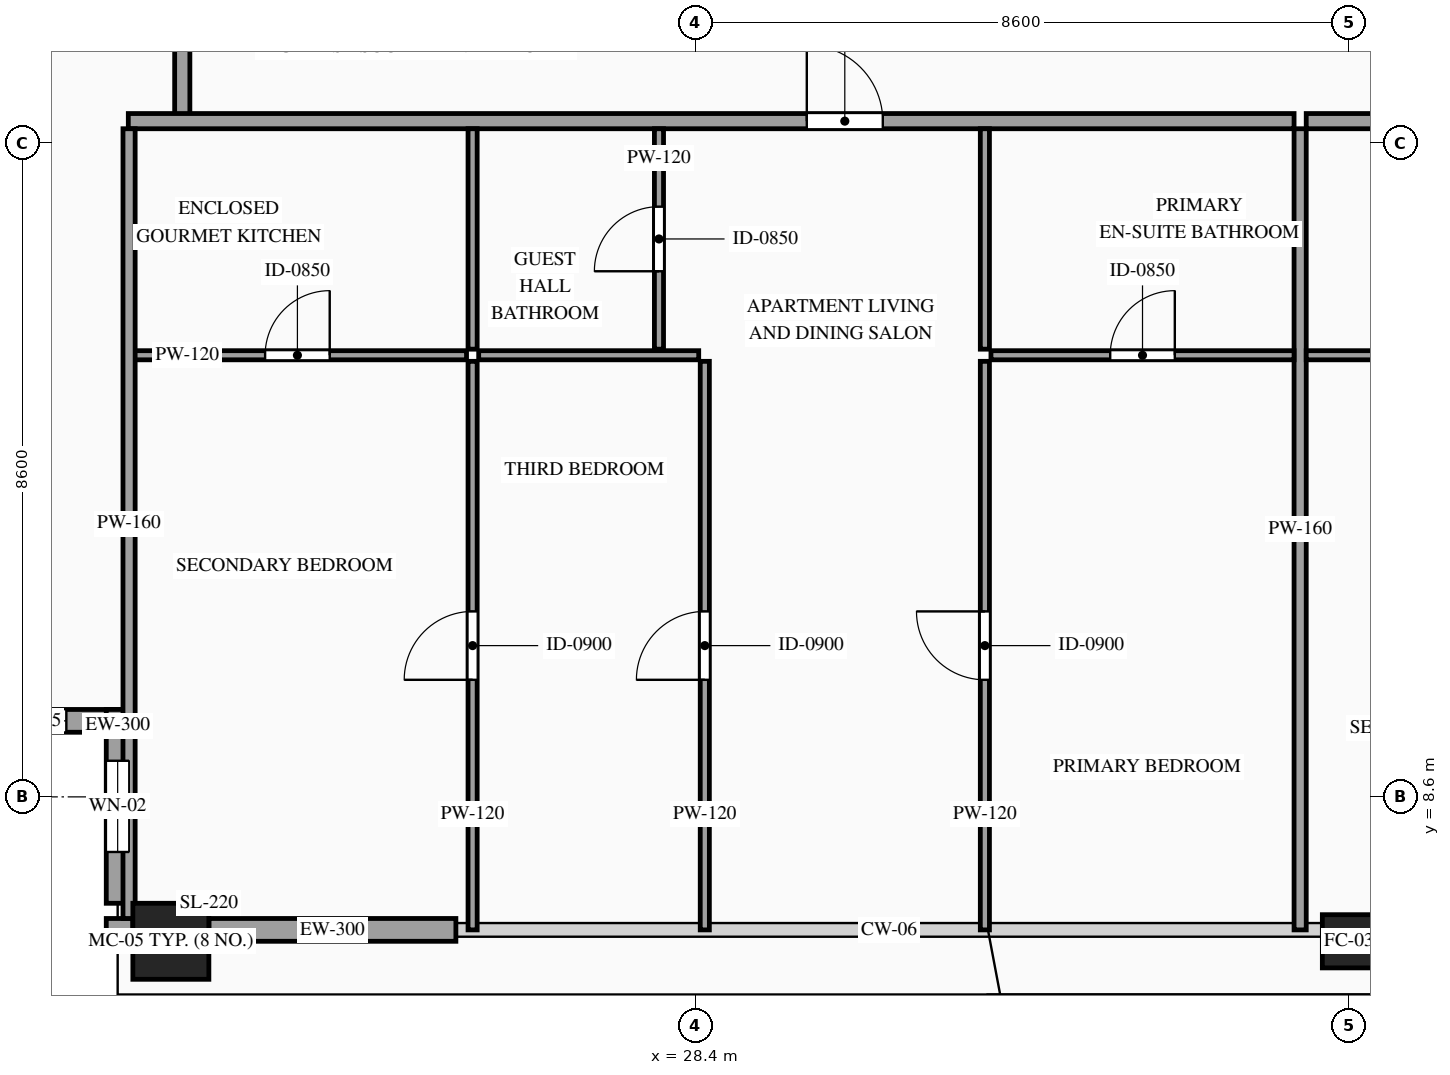
"""IFC4 building model, lengths in metres.
Left out: names, types, materials, properties, quantities, classifications, styles, units other than length and angle.
Written with IfcOpenShell. Run it as: python <this file> out.ifc"""

import sys

from ifc_helpers import new_model, si_unit, direction, frame, frame_2d, origin, origin_2d, place, context, subcontext, project, spatial, rectangle, hollow_rectangle, extrude, source, transform, mapped, element, fill, save


model = new_model("IFC4")
c1 = context("Model", 3, precision=1e-05, world=origin(), true_north=direction((0.0, 1.0)))
c2 = subcontext(c1, "Body", "Model", "MODEL_VIEW")
j1 = project(units=[si_unit("LENGTHUNIT", "METRE"), si_unit("PLANEANGLEUNIT", "RADIAN")], contexts=[c1])
p1 = place(None, origin())
s1 = spatial("IfcSite", under=j1, at=p1, CompositionType="ELEMENT")
p2 = place(p1, origin())
s2 = spatial("IfcBuilding", under=s1, at=p2, CompositionType="ELEMENT")
p3 = place(p2, frame((0.0, 0.0, 299.6)))
s3 = spatial("IfcBuildingStorey", under=s2, at=p3, CompositionType="ELEMENT", Elevation=299.6)
m1 = source(origin(), c2, "Body", "SweptSolid", [
    extrude(hollow_rectangle(XDim=1.0, YDim=1.0, WallThickness=0.048, at=origin_2d()), origin(), (0.0, 0.0, 1.0), 3.5),
])
p4 = place(p3, frame((21.5, 6.7, 0.0), z_axis=(0.0, 0.0, 1.0), x_axis=(1.0, 0.0, 0.0)))
e1 = element("IfcColumn", 1, at=p4, inside=s3, PredefinedType="COLUMN", context=c2, shape_type="MappedRepresentation", body=[
    mapped(m1, transform((0.0, 0.0, 0.0), scale=1.0)),
])
m2 = source(origin(), c2, "Body", "SweptSolid", [
    extrude(hollow_rectangle(XDim=0.7, YDim=0.7, WallThickness=0.032, at=origin_2d()), origin(), (0.0, 0.0, 1.0), 3.5),
])
p5 = place(p3, frame((37.0, 6.7, 0.0), z_axis=(0.0, 0.0, 1.0), x_axis=(1.0, 0.0, 0.0)))
e2 = element("IfcColumn", 2, at=p5, inside=s3, PredefinedType="COLUMN", context=c2, shape_type="MappedRepresentation", body=[
    mapped(m2, transform((0.0, 0.0, 0.0), scale=1.0)),
])
p6 = place(p3, frame((18.4, 9.6, 0.0), z_axis=(0.0, 0.0, 1.0), x_axis=(1.0, 0.0, 0.0)))
e3 = element("IfcWall", 3, at=p6, inside=s3, PredefinedType="SOLIDWALL", context=c2, shape_type="SweptSolid", body=[
    extrude(rectangle(XDim=2.55, YDim=0.3, at=frame_2d((1.275, 0.0))), origin(), (0.0, 0.0, 1.0), 3.28),
])
p7 = place(p6, frame((0.825, 0.0, 0.85)))
e4 = element("IfcOpeningElement", 4, at=p7, cuts=e3, PredefinedType="OPENING", context=c2, shape_type="SweptSolid", body=[
    extrude(rectangle(XDim=0.9, YDim=1.5, at=frame_2d((0.45, 0.75))), frame((0.0, 0.165, 0.0), z_axis=(0.0, -1.0, 0.0), x_axis=(1.0, 0.0, 0.0)), (0.0, 0.0, 1.0), 0.33),
])
p8 = place(p3, frame((20.8, 9.75, 0.0), z_axis=(0.0, 0.0, 1.0), x_axis=(0.0, -1.0, 0.0)))
e5 = element("IfcWall", 5, at=p8, inside=s3, PredefinedType="SOLIDWALL", context=c2, shape_type="SweptSolid", body=[
    extrude(rectangle(XDim=2.55, YDim=0.3, at=frame_2d((1.275, 0.0))), origin(), (0.0, 0.0, 1.0), 3.28),
])
p9 = place(p8, frame((0.675, 0.0, 0.85)))
e6 = element("IfcOpeningElement", 6, at=p9, cuts=e5, PredefinedType="OPENING", context=c2, shape_type="SweptSolid", body=[
    extrude(rectangle(XDim=1.2, YDim=2.1, at=frame_2d((0.6, 1.05))), frame((0.0, 0.165, 0.0), z_axis=(0.0, -1.0, 0.0), x_axis=(1.0, 0.0, 0.0)), (0.0, 0.0, 1.0), 0.33),
])
m3 = source(origin(), c2, "Body", "SweptSolid", [
    extrude(rectangle(XDim=0.35, YDim=0.3, at=frame_2d((0.175, 0.0))), origin(), (0.0, 0.0, 1.0), 3.28),
])
p10 = place(p3, frame((20.65, 6.85, 0.0), z_axis=(0.0, 0.0, 1.0), x_axis=(1.0, 0.0, 0.0)))
e7 = element("IfcWall", 7, at=p10, inside=s3, PredefinedType="SOLIDWALL", context=c2, shape_type="MappedRepresentation", body=[
    mapped(m3, transform((0.0, 0.0, 0.0), scale=1.0)),
])
m4 = source(origin(), c2, "Body", "SweptSolid", [
    extrude(rectangle(XDim=3.25, YDim=0.3, at=frame_2d((1.625, 0.0))), origin(), (0.0, 0.0, 1.0), 2.885),
])
p11 = place(p3, frame((22.0, 6.85, 0.0), z_axis=(0.0, 0.0, 1.0), x_axis=(1.0, 0.0, 0.0)))
e8 = element("IfcWall", 8, at=p11, inside=s3, PredefinedType="SOLIDWALL", context=c2, shape_type="MappedRepresentation", body=[
    mapped(m4, transform((0.0, 0.0, 0.0), scale=1.0)),
])
m5 = source(origin(), c2, "Body", "SweptSolid", [
    extrude(rectangle(XDim=1.7, YDim=0.2, at=frame_2d((0.85, 0.0))), origin(), (0.0, 0.0, 1.0), 3.28),
])
p12 = place(p3, frame((21.65, 17.55, 0.0), z_axis=(0.0, 0.0, 1.0), x_axis=(0.0, 1.0, 0.0)))
e9 = element("IfcWall", 9, at=p12, inside=s3, PredefinedType="PARTITIONING", context=c2, shape_type="MappedRepresentation", body=[
    mapped(m5, transform((0.0, 0.0, 0.0), scale=1.0)),
])
p13 = place(p3, frame((20.94, 17.49, 0.0), z_axis=(0.0, 0.0, 1.0), x_axis=(1.0, 0.0, 0.0)))
e10 = element("IfcWall", 10, at=p13, inside=s3, PredefinedType="PARTITIONING", context=c2, shape_type="SweptSolid", body=[
    extrude(rectangle(XDim=15.338, YDim=0.2, at=frame_2d((7.669, 0.0))), origin(), (0.0, 0.0, 1.0), 3.28),
])
p14 = place(p13, frame((8.927, 0.0, 0.0)))
e11 = element("IfcOpeningElement", 11, at=p14, cuts=e10, PredefinedType="OPENING", context=c2, shape_type="SweptSolid", body=[
    extrude(rectangle(XDim=1.0, YDim=2.2, at=frame_2d((0.5, 1.1))), frame((0.0, 0.115, 0.0), z_axis=(0.0, -1.0, 0.0), x_axis=(1.0, 0.0, 0.0)), (0.0, 0.0, 1.0), 0.23),
])
m6 = source(origin(), c2, "Body", "SweptSolid", [
    extrude(rectangle(XDim=10.54, YDim=0.16, at=frame_2d((5.27, 0.0))), origin(), (0.0, 0.0, 1.0), 3.28),
])
p15 = place(p3, frame((36.358, 6.85, 0.0), z_axis=(0.0, 0.0, 1.0), x_axis=(0.0, 1.0, 0.0)))
e12 = element("IfcWall", 12, at=p15, inside=s3, PredefinedType="PARTITIONING", context=c2, shape_type="MappedRepresentation", body=[
    mapped(m6, transform((0.0, 0.0, 0.0), scale=1.0)),
])
p16 = place(p3, frame((20.94, 14.41, 0.0), z_axis=(0.0, 0.0, 1.0), x_axis=(1.0, 0.0, 0.0)))
e13 = element("IfcWall", 13, at=p16, inside=s3, PredefinedType="PARTITIONING", context=c2, shape_type="SweptSolid", body=[
    extrude(rectangle(XDim=4.45, YDim=0.12, at=frame_2d((2.225, 0.0))), origin(), (0.0, 0.0, 1.0), 3.28),
])
p17 = place(p16, frame((1.8, 0.0, 0.0)))
e14 = element("IfcOpeningElement", 14, at=p17, cuts=e13, PredefinedType="OPENING", context=c2, shape_type="SweptSolid", body=[
    extrude(rectangle(XDim=0.85, YDim=2.1, at=frame_2d((0.425, 1.05))), frame((0.0, 0.075, 0.0), z_axis=(0.0, -1.0, 0.0), x_axis=(1.0, 0.0, 0.0)), (0.0, 0.0, 1.0), 0.15),
])
m7 = source(origin(), c2, "Body", "SweptSolid", [
    extrude(rectangle(XDim=2.9, YDim=0.12, at=frame_2d((1.45, 0.0))), origin(), (0.0, 0.0, 1.0), 3.28),
])
p18 = place(p3, frame((25.47, 14.49, 0.0), z_axis=(0.0, 0.0, 1.0), x_axis=(0.0, 1.0, 0.0)))
e15 = element("IfcWall", 15, at=p18, inside=s3, PredefinedType="PARTITIONING", context=c2, shape_type="MappedRepresentation", body=[
    mapped(m7, transform((0.0, 0.0, 0.0), scale=1.0)),
])
p19 = place(p3, frame((27.922, 14.49, 0.0), z_axis=(0.0, 0.0, 1.0), x_axis=(0.0, 1.0, 0.0)))
e16 = element("IfcWall", 16, at=p19, inside=s3, PredefinedType="PARTITIONING", context=c2, shape_type="SweptSolid", body=[
    extrude(rectangle(XDim=2.9, YDim=0.12, at=frame_2d((1.45, 0.0))), origin(), (0.0, 0.0, 1.0), 3.28),
])
p20 = place(p19, frame((1.025, 0.0, 0.0)))
e17 = element("IfcOpeningElement", 17, at=p20, cuts=e16, PredefinedType="OPENING", context=c2, shape_type="SweptSolid", body=[
    extrude(rectangle(XDim=0.85, YDim=2.1, at=frame_2d((0.425, 1.05))), frame((0.0, 0.075, 0.0), z_axis=(0.0, -1.0, 0.0), x_axis=(1.0, 0.0, 0.0)), (0.0, 0.0, 1.0), 0.15),
])
p21 = place(p3, frame((32.29, 14.41, 0.0), z_axis=(0.0, 0.0, 1.0), x_axis=(1.0, 0.0, 0.0)))
e18 = element("IfcWall", 18, at=p21, inside=s3, PredefinedType="PARTITIONING", context=c2, shape_type="SweptSolid", body=[
    extrude(rectangle(XDim=3.988, YDim=0.12, at=frame_2d((1.994, 0.0))), origin(), (0.0, 0.0, 1.0), 3.28),
])
p22 = place(p21, frame((1.569, 0.0, 0.0)))
e19 = element("IfcOpeningElement", 19, at=p22, cuts=e18, PredefinedType="OPENING", context=c2, shape_type="SweptSolid", body=[
    extrude(rectangle(XDim=0.85, YDim=2.1, at=frame_2d((0.425, 1.05))), frame((0.0, 0.075, 0.0), z_axis=(0.0, -1.0, 0.0), x_axis=(1.0, 0.0, 0.0)), (0.0, 0.0, 1.0), 0.15),
])
p23 = place(p3, frame((32.21, 14.49, 0.0), z_axis=(0.0, 0.0, 1.0), x_axis=(0.0, 1.0, 0.0)))
e20 = element("IfcWall", 20, at=p23, inside=s3, PredefinedType="PARTITIONING", context=c2, shape_type="MappedRepresentation", body=[
    mapped(m7, transform((0.0, 0.0, 0.0), scale=1.0)),
])
p24 = place(p3, frame((25.47, 6.85, 0.0), z_axis=(0.0, 0.0, 1.0), x_axis=(0.0, 1.0, 0.0)))
e21 = element("IfcWall", 21, at=p24, inside=s3, PredefinedType="PARTITIONING", context=c2, shape_type="SweptSolid", body=[
    extrude(rectangle(XDim=7.48, YDim=0.12, at=frame_2d((3.74, 0.0))), origin(), (0.0, 0.0, 1.0), 3.28),
])
p25 = place(p24, frame((3.29, 0.0, 0.0)))
e22 = element("IfcOpeningElement", 22, at=p25, cuts=e21, PredefinedType="OPENING", context=c2, shape_type="SweptSolid", body=[
    extrude(rectangle(XDim=0.9, YDim=2.15, at=frame_2d((0.45, 1.075))), frame((0.0, 0.075, 0.0), z_axis=(0.0, -1.0, 0.0), x_axis=(1.0, 0.0, 0.0)), (0.0, 0.0, 1.0), 0.15),
])
p26 = place(p3, frame((32.21, 6.85, 0.0), z_axis=(0.0, 0.0, 1.0), x_axis=(0.0, 1.0, 0.0)))
e23 = element("IfcWall", 23, at=p26, inside=s3, PredefinedType="PARTITIONING", context=c2, shape_type="SweptSolid", body=[
    extrude(rectangle(XDim=7.48, YDim=0.12, at=frame_2d((3.74, 0.0))), origin(), (0.0, 0.0, 1.0), 3.28),
])
p27 = place(p26, frame((3.29, 0.0, 0.0)))
e24 = element("IfcOpeningElement", 24, at=p27, cuts=e23, PredefinedType="OPENING", context=c2, shape_type="SweptSolid", body=[
    extrude(rectangle(XDim=0.9, YDim=2.15, at=frame_2d((0.45, 1.075))), frame((0.0, 0.075, 0.0), z_axis=(0.0, -1.0, 0.0), x_axis=(1.0, 0.0, 0.0)), (0.0, 0.0, 1.0), 0.15),
])
m8 = source(origin(), c2, "Body", "SweptSolid", [
    extrude(rectangle(XDim=2.895, YDim=0.12, at=frame_2d((1.448, 0.0))), origin(), (0.0, 0.0, 1.0), 3.28),
])
p28 = place(p3, frame((25.55, 14.41, 0.0), z_axis=(0.0, 0.0, 1.0), x_axis=(1.0, 0.0, 0.0)))
e25 = element("IfcWall", 25, at=p28, inside=s3, PredefinedType="PARTITIONING", context=c2, shape_type="MappedRepresentation", body=[
    mapped(m8, transform((0.0, 0.0, 0.0), scale=1.0)),
])
p29 = place(p3, frame((28.525, 6.85, 0.0), z_axis=(0.0, 0.0, 1.0), x_axis=(0.0, 1.0, 0.0)))
e26 = element("IfcWall", 26, at=p29, inside=s3, PredefinedType="PARTITIONING", context=c2, shape_type="SweptSolid", body=[
    extrude(rectangle(XDim=7.48, YDim=0.12, at=frame_2d((3.74, 0.0))), origin(), (0.0, 0.0, 1.0), 3.28),
])
p30 = place(p29, frame((3.29, 0.0, 0.0)))
e27 = element("IfcOpeningElement", 27, at=p30, cuts=e26, PredefinedType="OPENING", context=c2, shape_type="SweptSolid", body=[
    extrude(rectangle(XDim=0.9, YDim=2.15, at=frame_2d((0.45, 1.075))), frame((0.0, 0.075, 0.0), z_axis=(0.0, -1.0, 0.0), x_axis=(1.0, 0.0, 0.0)), (0.0, 0.0, 1.0), 0.15),
])
p31 = place(p3, frame((36.438, 17.49, 0.0), z_axis=(0.0, 0.0, 1.0), x_axis=(1.0, 0.0, 0.0)))
e28 = element("IfcWall", 28, at=p31, inside=s3, PredefinedType="PARTITIONING", context=c2, shape_type="SweptSolid", body=[
    extrude(rectangle(XDim=16.622, YDim=0.2, at=frame_2d((8.311, 0.0))), origin(), (0.0, 0.0, 1.0), 3.28),
])
p32 = place(p31, frame((9.611, 0.0, 0.0)))
e29 = element("IfcOpeningElement", 29, at=p32, cuts=e28, PredefinedType="OPENING", context=c2, shape_type="SweptSolid", body=[
    extrude(rectangle(XDim=1.0, YDim=2.2, at=frame_2d((0.5, 1.1))), frame((0.0, 0.115, 0.0), z_axis=(0.0, -1.0, 0.0), x_axis=(1.0, 0.0, 0.0)), (0.0, 0.0, 1.0), 0.23),
])
m9 = source(origin(), c2, "Body", "SweptSolid", [
    extrude(rectangle(XDim=10.39, YDim=0.16, at=frame_2d((5.195, 0.0))), origin(), (0.0, 0.0, 1.0), 3.28),
])
p33 = place(p3, frame((20.95, 7.0, 0.0), z_axis=(0.0, 0.0, 1.0), x_axis=(0.0, 1.0, 0.0)))
e30 = element("IfcWall", 30, at=p33, inside=s3, PredefinedType="PARTITIONING", context=c2, shape_type="MappedRepresentation", body=[
    mapped(m9, transform((0.0, 0.0, 0.0), scale=1.0)),
])
p34 = place(p3, frame((36.438, 14.41, 0.0), z_axis=(0.0, 0.0, 1.0), x_axis=(1.0, 0.0, 0.0)))
e31 = element("IfcWall", 31, at=p34, inside=s3, PredefinedType="PARTITIONING", context=c2, shape_type="SweptSolid", body=[
    extrude(rectangle(XDim=4.45, YDim=0.12, at=frame_2d((2.225, 0.0))), origin(), (0.0, 0.0, 1.0), 3.28),
])
p35 = place(p34, frame((1.8, 0.0, 0.0)))
e32 = element("IfcOpeningElement", 32, at=p35, cuts=e31, PredefinedType="OPENING", context=c2, shape_type="SweptSolid", body=[
    extrude(rectangle(XDim=0.85, YDim=2.1, at=frame_2d((0.425, 1.05))), frame((0.0, 0.075, 0.0), z_axis=(0.0, -1.0, 0.0), x_axis=(1.0, 0.0, 0.0)), (0.0, 0.0, 1.0), 0.15),
])
m10 = source(origin(), c2, "Body", "SweptSolid", [
    extrude(rectangle(XDim=0.9, YDim=1.5, at=frame_2d((0.45, 0.75))), frame((0.0, 0.03, 0.0), z_axis=(0.0, -1.0, 0.0), x_axis=(1.0, 0.0, 0.0)), (0.0, 0.0, 1.0), 0.06),
])
p36 = place(p7, origin())
e33 = element("IfcWindow", 33, at=p36, inside=s3, PartitioningType="SINGLE_PANEL", PredefinedType="WINDOW", context=c2, shape_type="MappedRepresentation", body=[
    mapped(m10, transform((0.0, 0.0, 0.0), scale=1.0)),
])
fill(e4, e33)
m11 = source(origin(), c2, "Body", "SweptSolid", [
    extrude(rectangle(XDim=1.2, YDim=2.1, at=frame_2d((0.6, 1.05))), frame((0.0, 0.03, 0.0), z_axis=(0.0, -1.0, 0.0), x_axis=(1.0, 0.0, 0.0)), (0.0, 0.0, 1.0), 0.06),
])
p37 = place(p9, origin())
e34 = element("IfcWindow", 34, at=p37, inside=s3, PartitioningType="SINGLE_PANEL", PredefinedType="WINDOW", context=c2, shape_type="MappedRepresentation", body=[
    mapped(m11, transform((0.0, 0.0, 0.0), scale=1.0)),
])
fill(e6, e34)
m12 = source(origin(), c2, "Body", "SweptSolid", [
    extrude(rectangle(XDim=1.0, YDim=2.2, at=frame_2d((0.5, 1.1))), frame((0.0, 0.025, 0.0), z_axis=(0.0, -1.0, 0.0), x_axis=(1.0, 0.0, 0.0)), (0.0, 0.0, 1.0), 0.05),
])
p38 = place(p14, origin())
e35 = element("IfcDoor", 35, at=p38, inside=s3, OperationType="SINGLE_SWING_LEFT", PredefinedType="DOOR", context=c2, shape_type="MappedRepresentation", body=[
    mapped(m12, transform((0.0, 0.0, 0.0), scale=1.0)),
])
fill(e11, e35)
m13 = source(origin(), c2, "Body", "SweptSolid", [
    extrude(rectangle(XDim=0.85, YDim=2.1, at=frame_2d((0.425, 1.05))), frame((0.0, 0.025, 0.0), z_axis=(0.0, -1.0, 0.0), x_axis=(1.0, 0.0, 0.0)), (0.0, 0.0, 1.0), 0.05),
])
p39 = place(p17, origin())
e36 = element("IfcDoor", 36, at=p39, inside=s3, OperationType="SINGLE_SWING_RIGHT", PredefinedType="DOOR", context=c2, shape_type="MappedRepresentation", body=[
    mapped(m13, transform((0.0, 0.0, 0.0), scale=1.0)),
])
fill(e14, e36)
p40 = place(p20, origin())
e37 = element("IfcDoor", 37, at=p40, inside=s3, OperationType="SINGLE_SWING_LEFT", PredefinedType="DOOR", context=c2, shape_type="MappedRepresentation", body=[
    mapped(m13, transform((0.0, 0.0, 0.0), scale=1.0)),
])
fill(e17, e37)
p41 = place(p22, origin())
e38 = element("IfcDoor", 38, at=p41, inside=s3, OperationType="SINGLE_SWING_RIGHT", PredefinedType="DOOR", context=c2, shape_type="MappedRepresentation", body=[
    mapped(m13, transform((0.0, 0.0, 0.0), scale=1.0)),
])
fill(e19, e38)
m14 = source(origin(), c2, "Body", "SweptSolid", [
    extrude(rectangle(XDim=0.9, YDim=2.15, at=frame_2d((0.45, 1.075))), frame((0.0, 0.025, 0.0), z_axis=(0.0, -1.0, 0.0), x_axis=(1.0, 0.0, 0.0)), (0.0, 0.0, 1.0), 0.05),
])
p42 = place(p25, origin())
e39 = element("IfcDoor", 39, at=p42, inside=s3, OperationType="SINGLE_SWING_LEFT", PredefinedType="DOOR", context=c2, shape_type="MappedRepresentation", body=[
    mapped(m14, transform((0.0, 0.0, 0.0), scale=1.0)),
])
fill(e22, e39)
p43 = place(p27, origin())
e40 = element("IfcDoor", 40, at=p43, inside=s3, OperationType="SINGLE_SWING_RIGHT", PredefinedType="DOOR", context=c2, shape_type="MappedRepresentation", body=[
    mapped(m14, transform((0.0, 0.0, 0.0), scale=1.0)),
])
fill(e24, e40)
p44 = place(p30, origin())
e41 = element("IfcDoor", 41, at=p44, inside=s3, OperationType="SINGLE_SWING_LEFT", PredefinedType="DOOR", context=c2, shape_type="MappedRepresentation", body=[
    mapped(m14, transform((0.0, 0.0, 0.0), scale=1.0)),
])
fill(e27, e41)
save(model, sys.argv[1])
